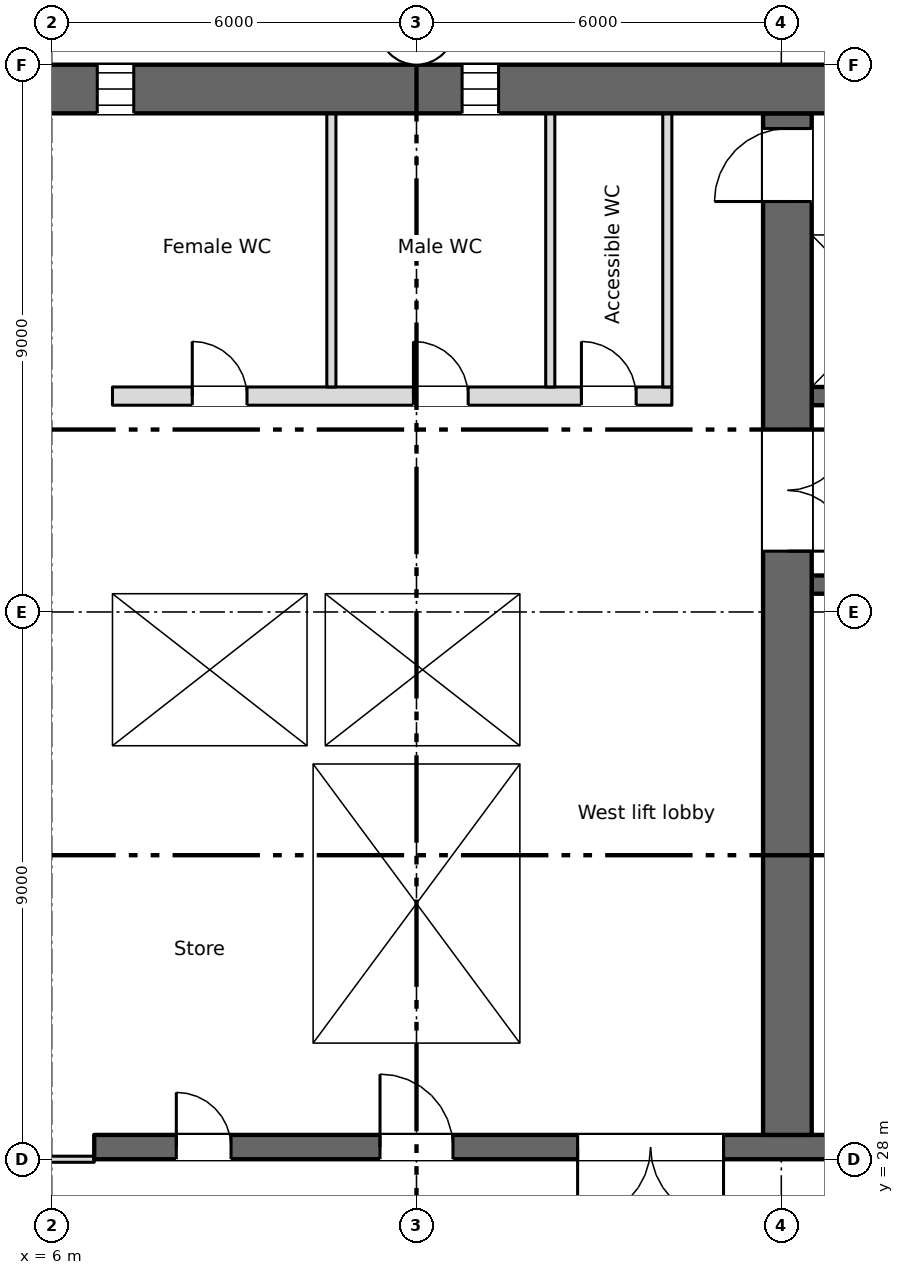
"""IFC4 building model, lengths in metres.
Left out: names, types, materials, properties, quantities, classifications, styles, units other than length and angle.
Written with IfcOpenShell. Run it as: python <this file> out.ifc"""

import sys

from ifc_helpers import new_model, si_unit, direction, frame, frame_2d, origin, place, context, subcontext, project, spatial, rectangle, extrude, element, fill, save


model = new_model("IFC4")
c1 = context("Model", 3, precision=1e-05, world=origin(), true_north=direction((0.0, 1.0)))
c2 = subcontext(c1, "Body", "Model", "MODEL_VIEW")
j1 = project(units=[si_unit("LENGTHUNIT", "METRE"), si_unit("PLANEANGLEUNIT", "RADIAN")], contexts=[c1])
p1 = place(None, origin())
s1 = spatial("IfcSite", under=j1, at=p1, CompositionType="ELEMENT")
p2 = place(p1, origin())
s2 = spatial("IfcBuilding", under=s1, at=p2, CompositionType="ELEMENT")
p3 = place(p2, frame((0.0, 0.0, 102.5)))
s3 = spatial("IfcBuildingStorey", under=s2, at=p3, CompositionType="ELEMENT", Elevation=102.5)
p4 = place(p3, frame((5.55, 45.6, 0.0), z_axis=(0.0, 0.0, 1.0), x_axis=(1.0, 0.0, 0.0)))
e1 = element("IfcWall", 1, at=p4, inside=s3, PredefinedType="SHEAR", context=c2, shape_type="SweptSolid", body=[
    extrude(rectangle(XDim=60.9, YDim=0.8, at=frame_2d((30.45, 0.0))), origin(), (0.0, 0.0, 1.0), 3.35),
])
p5 = place(p4, frame((1.2, 0.0, 0.6)))
e2 = element("IfcOpeningElement", 2, at=p5, cuts=e1, PredefinedType="OPENING", context=c2, shape_type="SweptSolid", body=[
    extrude(rectangle(XDim=0.6, YDim=2.4, at=frame_2d((0.3, 1.2))), frame((0.0, 0.41, 0.0), z_axis=(0.0, -1.0, 0.0), x_axis=(1.0, 0.0, 0.0)), (0.0, 0.0, 1.0), 0.82),
])
p6 = place(p4, frame((7.2, 0.0, 0.6)))
e3 = element("IfcOpeningElement", 3, at=p6, cuts=e1, PredefinedType="OPENING", context=c2, shape_type="SweptSolid", body=[
    extrude(rectangle(XDim=0.6, YDim=2.4, at=frame_2d((0.3, 1.2))), frame((0.0, 0.41, 0.0), z_axis=(0.0, -1.0, 0.0), x_axis=(1.0, 0.0, 0.0)), (0.0, 0.0, 1.0), 0.82),
])
p7 = place(p3, frame((6.7, 28.2, 0.0), z_axis=(0.0, 0.0, 1.0), x_axis=(1.0, 0.0, 0.0)))
e4 = element("IfcWall", 4, at=p7, inside=s3, PredefinedType="SHEAR", context=c2, shape_type="SweptSolid", body=[
    extrude(rectangle(XDim=57.8, YDim=0.4, at=frame_2d((28.9, 0.0))), origin(), (0.0, 0.0, 1.0), 3.35),
])
p8 = place(p7, frame((13.85, 0.0, 0.0)))
e5 = element("IfcOpeningElement", 5, at=p8, cuts=e4, PredefinedType="OPENING", context=c2, shape_type="SweptSolid", body=[
    extrude(rectangle(XDim=0.9, YDim=2.1, at=frame_2d((0.45, 1.05))), frame((0.0, 0.21, 0.0), z_axis=(0.0, -1.0, 0.0), x_axis=(1.0, 0.0, 0.0)), (0.0, 0.0, 1.0), 0.42),
])
p9 = place(p7, frame((48.562, 0.0, 0.0)))
e6 = element("IfcOpeningElement", 6, at=p9, cuts=e4, PredefinedType="OPENING", context=c2, shape_type="SweptSolid", body=[
    extrude(rectangle(XDim=0.9, YDim=2.1, at=frame_2d((0.45, 1.05))), frame((0.0, 0.21, 0.0), z_axis=(0.0, -1.0, 0.0), x_axis=(1.0, 0.0, 0.0)), (0.0, 0.0, 1.0), 0.42),
])
p10 = place(p7, frame((51.137, 0.0, 0.0)))
e7 = element("IfcOpeningElement", 7, at=p10, cuts=e4, PredefinedType="OPENING", context=c2, shape_type="SweptSolid", body=[
    extrude(rectangle(XDim=0.9, YDim=2.1, at=frame_2d((0.45, 1.05))), frame((0.0, 0.21, 0.0), z_axis=(0.0, -1.0, 0.0), x_axis=(1.0, 0.0, 0.0)), (0.0, 0.0, 1.0), 0.42),
])
p11 = place(p7, frame((1.35, 0.0, 0.0)))
e8 = element("IfcOpeningElement", 8, at=p11, cuts=e4, PredefinedType="OPENING", context=c2, shape_type="SweptSolid", body=[
    extrude(rectangle(XDim=0.9, YDim=2.1, at=frame_2d((0.45, 1.05))), frame((0.0, 0.21, 0.0), z_axis=(0.0, -1.0, 0.0), x_axis=(1.0, 0.0, 0.0)), (0.0, 0.0, 1.0), 0.42),
])
p12 = place(p7, frame((4.7, 0.0, 0.0)))
e9 = element("IfcOpeningElement", 9, at=p12, cuts=e4, PredefinedType="OPENING", context=c2, shape_type="SweptSolid", body=[
    extrude(rectangle(XDim=1.2, YDim=2.1, at=frame_2d((0.6, 1.05))), frame((0.0, 0.21, 0.0), z_axis=(0.0, -1.0, 0.0), x_axis=(1.0, 0.0, 0.0)), (0.0, 0.0, 1.0), 0.42),
])
p13 = place(p7, frame((31.7, 0.0, 0.0)))
e10 = element("IfcOpeningElement", 10, at=p13, cuts=e4, PredefinedType="OPENING", context=c2, shape_type="SweptSolid", body=[
    extrude(rectangle(XDim=1.2, YDim=2.1, at=frame_2d((0.6, 1.05))), frame((0.0, 0.21, 0.0), z_axis=(0.0, -1.0, 0.0), x_axis=(1.0, 0.0, 0.0)), (0.0, 0.0, 1.0), 0.42),
])
p14 = place(p7, frame((55.2, 0.0, 0.0)))
e11 = element("IfcOpeningElement", 11, at=p14, cuts=e4, PredefinedType="OPENING", context=c2, shape_type="SweptSolid", body=[
    extrude(rectangle(XDim=1.2, YDim=2.1, at=frame_2d((0.6, 1.05))), frame((0.0, 0.21, 0.0), z_axis=(0.0, -1.0, 0.0), x_axis=(1.0, 0.0, 0.0)), (0.0, 0.0, 1.0), 0.42),
])
p15 = place(p7, frame((21.7, 0.0, 0.0)))
e12 = element("IfcOpeningElement", 12, at=p15, cuts=e4, PredefinedType="OPENING", context=c2, shape_type="SweptSolid", body=[
    extrude(rectangle(XDim=1.2, YDim=2.1, at=frame_2d((0.6, 1.05))), frame((0.0, 0.21, 0.0), z_axis=(0.0, -1.0, 0.0), x_axis=(1.0, 0.0, 0.0)), (0.0, 0.0, 1.0), 0.42),
])
p16 = place(p7, frame((41.7, 0.0, 0.0)))
e13 = element("IfcOpeningElement", 13, at=p16, cuts=e4, PredefinedType="OPENING", context=c2, shape_type="SweptSolid", body=[
    extrude(rectangle(XDim=1.2, YDim=2.1, at=frame_2d((0.6, 1.05))), frame((0.0, 0.21, 0.0), z_axis=(0.0, -1.0, 0.0), x_axis=(1.0, 0.0, 0.0)), (0.0, 0.0, 1.0), 0.42),
])
p17 = place(p7, frame((24.85, 0.0, 0.0)))
e14 = element("IfcOpeningElement", 14, at=p17, cuts=e4, PredefinedType="OPENING", context=c2, shape_type="SweptSolid", body=[
    extrude(rectangle(XDim=2.4, YDim=2.1, at=frame_2d((1.2, 1.05))), frame((0.0, 0.21, 0.0), z_axis=(0.0, -1.0, 0.0), x_axis=(1.0, 0.0, 0.0)), (0.0, 0.0, 1.0), 0.42),
])
p18 = place(p7, frame((37.35, 0.0, 0.0)))
e15 = element("IfcOpeningElement", 15, at=p18, cuts=e4, PredefinedType="OPENING", context=c2, shape_type="SweptSolid", body=[
    extrude(rectangle(XDim=2.4, YDim=2.1, at=frame_2d((1.2, 1.05))), frame((0.0, 0.21, 0.0), z_axis=(0.0, -1.0, 0.0), x_axis=(1.0, 0.0, 0.0)), (0.0, 0.0, 1.0), 0.42),
])
p19 = place(p7, frame((7.95, 0.0, 0.0)))
e16 = element("IfcOpeningElement", 16, at=p19, cuts=e4, PredefinedType="OPENING", context=c2, shape_type="SweptSolid", body=[
    extrude(rectangle(XDim=2.4, YDim=2.1, at=frame_2d((1.2, 1.05))), frame((0.0, 0.21, 0.0), z_axis=(0.0, -1.0, 0.0), x_axis=(1.0, 0.0, 0.0)), (0.0, 0.0, 1.0), 0.42),
])
p20 = place(p7, frame((28.85, 0.0, 0.0)))
e17 = element("IfcOpeningElement", 17, at=p20, cuts=e4, PredefinedType="OPENING", context=c2, shape_type="SweptSolid", body=[
    extrude(rectangle(XDim=0.9, YDim=2.1, at=frame_2d((0.45, 1.05))), frame((0.0, 0.21, 0.0), z_axis=(0.0, -1.0, 0.0), x_axis=(1.0, 0.0, 0.0)), (0.0, 0.0, 1.0), 0.42),
])
p21 = place(p7, frame((34.85, 0.0, 0.0)))
e18 = element("IfcOpeningElement", 18, at=p21, cuts=e4, PredefinedType="OPENING", context=c2, shape_type="SweptSolid", body=[
    extrude(rectangle(XDim=0.9, YDim=2.1, at=frame_2d((0.45, 1.05))), frame((0.0, 0.21, 0.0), z_axis=(0.0, -1.0, 0.0), x_axis=(1.0, 0.0, 0.0)), (0.0, 0.0, 1.0), 0.42),
])
p22 = place(p3, frame((6.85, 28.4, 0.0), z_axis=(0.0, 0.0, 1.0), x_axis=(0.0, 1.0, 0.0)))
e19 = element("IfcWall", 19, at=p22, inside=s3, PredefinedType="SHEAR", context=c2, shape_type="SweptSolid", body=[
    extrude(rectangle(XDim=16.8, YDim=0.3, at=frame_2d((8.4, 0.0))), origin(), (0.0, 0.0, 1.0), 3.35),
])
p23 = place(p3, frame((18.1, 28.4, 0.0), z_axis=(0.0, 0.0, 1.0), x_axis=(0.0, 1.0, 0.0)))
e20 = element("IfcWall", 20, at=p23, inside=s3, PredefinedType="SHEAR", context=c2, shape_type="SweptSolid", body=[
    extrude(rectangle(XDim=16.8, YDim=0.8, at=frame_2d((8.4, 0.0))), origin(), (0.0, 0.0, 1.0), 3.35),
])
p24 = place(p23, frame((9.6, 0.0, 0.0)))
e21 = element("IfcOpeningElement", 21, at=p24, cuts=e20, PredefinedType="OPENING", context=c2, shape_type="SweptSolid", body=[
    extrude(rectangle(XDim=2.0, YDim=2.1, at=frame_2d((1.0, 1.05))), frame((0.0, 0.41, 0.0), z_axis=(0.0, -1.0, 0.0), x_axis=(1.0, 0.0, 0.0)), (0.0, 0.0, 1.0), 0.82),
])
p25 = place(p23, frame((15.35, 0.0, 0.0)))
e22 = element("IfcOpeningElement", 22, at=p25, cuts=e20, PredefinedType="OPENING", context=c2, shape_type="SweptSolid", body=[
    extrude(rectangle(XDim=1.2, YDim=2.1, at=frame_2d((0.6, 1.05))), frame((0.0, 0.41, 0.0), z_axis=(0.0, -1.0, 0.0), x_axis=(1.0, 0.0, 0.0)), (0.0, 0.0, 1.0), 0.82),
])
for number, where, z_axis, x_axis in (
    (23, (10.15, 28.4, 0.0), (0.0, 0.0, 1.0), (0.0, 1.0, 0.0)),
    (24, (13.85, 28.4, 0.0), (0.0, 0.0, 1.0), (0.0, 1.0, 0.0)),
):
    element("IfcWall", number, at=place(p3, frame(where, z_axis=z_axis, x_axis=x_axis)), inside=s3, PredefinedType="SHEAR", context=c2, shape_type="SweptSolid", body=[
        extrude(rectangle(XDim=6.1, YDim=0.3, at=frame_2d((3.05, 0.0))), origin(), (0.0, 0.0, 1.0), 3.35),
    ])
p26 = place(p3, frame((7.0, 34.65, 0.0), z_axis=(0.0, 0.0, 1.0), x_axis=(1.0, 0.0, 0.0)))
e25 = element("IfcWall", 25, at=p26, inside=s3, PredefinedType="SHEAR", context=c2, shape_type="SweptSolid", body=[
    extrude(rectangle(XDim=7.0, YDim=0.3, at=frame_2d((3.5, 0.0))), origin(), (0.0, 0.0, 1.0), 3.35),
])
p27 = place(p3, frame((18.5, 34.65, 0.0), z_axis=(0.0, 0.0, 1.0), x_axis=(1.0, 0.0, 0.0)))
e26 = element("IfcWall", 26, at=p27, inside=s3, PredefinedType="SHEAR", context=c2, shape_type="SweptSolid", body=[
    extrude(rectangle(XDim=12.2, YDim=0.3, at=frame_2d((6.1, 0.0))), origin(), (0.0, 0.0, 1.0), 3.35),
])
p28 = place(p27, frame((9.8, 0.0, 0.0)))
e27 = element("IfcOpeningElement", 27, at=p28, cuts=e26, PredefinedType="OPENING", context=c2, shape_type="SweptSolid", body=[
    extrude(rectangle(XDim=1.1, YDim=2.1, at=frame_2d((0.55, 1.05))), frame((0.0, 0.16, 0.0), z_axis=(0.0, -1.0, 0.0), x_axis=(1.0, 0.0, 0.0)), (0.0, 0.0, 1.0), 0.32),
])
p29 = place(p3, frame((7.0, 37.45, 0.0), z_axis=(0.0, 0.0, 1.0), x_axis=(1.0, 0.0, 0.0)))
e28 = element("IfcWall", 28, at=p29, inside=s3, PredefinedType="SHEAR", context=c2, shape_type="SweptSolid", body=[
    extrude(rectangle(XDim=7.0, YDim=0.3, at=frame_2d((3.5, 0.0))), origin(), (0.0, 0.0, 1.0), 3.35),
])
p30 = place(p3, frame((30.7, 37.45, 0.0), z_axis=(0.0, 0.0, 1.0), x_axis=(-1.0, 0.0, 0.0)))
e29 = element("IfcWall", 29, at=p30, inside=s3, PredefinedType="SHEAR", context=c2, shape_type="SweptSolid", body=[
    extrude(rectangle(XDim=12.2, YDim=0.3, at=frame_2d((6.1, 0.0))), origin(), (0.0, 0.0, 1.0), 3.35),
])
p31 = place(p30, frame((7.4, 0.0, 0.0)))
e30 = element("IfcOpeningElement", 30, at=p31, cuts=e29, PredefinedType="OPENING", context=c2, shape_type="SweptSolid", body=[
    extrude(rectangle(XDim=0.9, YDim=2.1, at=frame_2d((0.45, 1.05))), frame((0.0, 0.16, 0.0), z_axis=(0.0, -1.0, 0.0), x_axis=(1.0, 0.0, 0.0)), (0.0, 0.0, 1.0), 0.32),
])
p32 = place(p3, frame((13.85, 34.8, 0.0), z_axis=(0.0, 0.0, 1.0), x_axis=(0.0, 1.0, 0.0)))
e31 = element("IfcWall", 31, at=p32, inside=s3, PredefinedType="SHEAR", context=c2, shape_type="SweptSolid", body=[
    extrude(rectangle(XDim=2.5, YDim=0.3, at=frame_2d((1.25, 0.0))), origin(), (0.0, 0.0, 1.0), 3.35),
])
p33 = place(p3, frame((18.5, 40.55, 0.0), z_axis=(0.0, 0.0, 1.0), x_axis=(1.0, 0.0, 0.0)))
e32 = element("IfcWall", 32, at=p33, inside=s3, PredefinedType="SHEAR", context=c2, shape_type="SweptSolid", body=[
    extrude(rectangle(XDim=41.0, YDim=0.3, at=frame_2d((20.5, 0.0))), origin(), (0.0, 0.0, 1.0), 3.35),
])
p34 = place(p33, frame((18.65, 0.0, 0.0)))
e33 = element("IfcOpeningElement", 33, at=p34, cuts=e32, PredefinedType="OPENING", context=c2, shape_type="SweptSolid", body=[
    extrude(rectangle(XDim=0.9, YDim=2.1, at=frame_2d((0.45, 1.05))), frame((0.0, 0.16, 0.0), z_axis=(0.0, -1.0, 0.0), x_axis=(1.0, 0.0, 0.0)), (0.0, 0.0, 1.0), 0.32),
])
p35 = place(p33, frame((6.175, 0.0, 0.0)))
e34 = element("IfcOpeningElement", 34, at=p35, cuts=e32, PredefinedType="OPENING", context=c2, shape_type="SweptSolid", body=[
    extrude(rectangle(XDim=1.1, YDim=2.1, at=frame_2d((0.55, 1.05))), frame((0.0, 0.16, 0.0), z_axis=(0.0, -1.0, 0.0), x_axis=(1.0, 0.0, 0.0)), (0.0, 0.0, 1.0), 0.32),
])
p36 = place(p33, frame((8.925, 0.0, 0.0)))
e35 = element("IfcOpeningElement", 35, at=p36, cuts=e32, PredefinedType="OPENING", context=c2, shape_type="SweptSolid", body=[
    extrude(rectangle(XDim=1.1, YDim=2.1, at=frame_2d((0.55, 1.05))), frame((0.0, 0.16, 0.0), z_axis=(0.0, -1.0, 0.0), x_axis=(1.0, 0.0, 0.0)), (0.0, 0.0, 1.0), 0.32),
])
p37 = place(p33, frame((11.675, 0.0, 0.0)))
e36 = element("IfcOpeningElement", 36, at=p37, cuts=e32, PredefinedType="OPENING", context=c2, shape_type="SweptSolid", body=[
    extrude(rectangle(XDim=1.1, YDim=2.1, at=frame_2d((0.55, 1.05))), frame((0.0, 0.16, 0.0), z_axis=(0.0, -1.0, 0.0), x_axis=(1.0, 0.0, 0.0)), (0.0, 0.0, 1.0), 0.32),
])
p38 = place(p33, frame((30.925, 0.0, 0.0)))
e37 = element("IfcOpeningElement", 37, at=p38, cuts=e32, PredefinedType="OPENING", context=c2, shape_type="SweptSolid", body=[
    extrude(rectangle(XDim=1.1, YDim=2.1, at=frame_2d((0.55, 1.05))), frame((0.0, 0.16, 0.0), z_axis=(0.0, -1.0, 0.0), x_axis=(1.0, 0.0, 0.0)), (0.0, 0.0, 1.0), 0.32),
])
p39 = place(p33, frame((33.675, 0.0, 0.0)))
e38 = element("IfcOpeningElement", 38, at=p39, cuts=e32, PredefinedType="OPENING", context=c2, shape_type="SweptSolid", body=[
    extrude(rectangle(XDim=1.1, YDim=2.1, at=frame_2d((0.55, 1.05))), frame((0.0, 0.16, 0.0), z_axis=(0.0, -1.0, 0.0), x_axis=(1.0, 0.0, 0.0)), (0.0, 0.0, 1.0), 0.32),
])
p40 = place(p33, frame((36.375, 0.0, 0.0)))
e39 = element("IfcOpeningElement", 39, at=p40, cuts=e32, PredefinedType="OPENING", context=c2, shape_type="SweptSolid", body=[
    extrude(rectangle(XDim=1.2, YDim=2.1, at=frame_2d((0.6, 1.05))), frame((0.0, 0.16, 0.0), z_axis=(0.0, -1.0, 0.0), x_axis=(1.0, 0.0, 0.0)), (0.0, 0.0, 1.0), 0.32),
])
p41 = place(p33, frame((39.15, 0.0, 0.0)))
e40 = element("IfcOpeningElement", 40, at=p41, cuts=e32, PredefinedType="OPENING", context=c2, shape_type="SweptSolid", body=[
    extrude(rectangle(XDim=1.2, YDim=2.1, at=frame_2d((0.6, 1.05))), frame((0.0, 0.16, 0.0), z_axis=(0.0, -1.0, 0.0), x_axis=(1.0, 0.0, 0.0)), (0.0, 0.0, 1.0), 0.32),
])
p42 = place(p3, frame((18.5, 43.35, 0.0), z_axis=(0.0, 0.0, 1.0), x_axis=(1.0, 0.0, 0.0)))
e41 = element("IfcWall", 41, at=p42, inside=s3, PredefinedType="SHEAR", context=c2, shape_type="SweptSolid", body=[
    extrude(rectangle(XDim=41.0, YDim=0.3, at=frame_2d((20.5, 0.0))), origin(), (0.0, 0.0, 1.0), 3.35),
])
p43 = place(p3, frame((7.0, 40.55, 0.0), z_axis=(0.0, 0.0, 1.0), x_axis=(1.0, 0.0, 0.0)))
e42 = element("IfcWall", 42, at=p43, inside=s3, PredefinedType="PARTITIONING", context=c2, shape_type="SweptSolid", body=[
    extrude(rectangle(XDim=9.2, YDim=0.3, at=frame_2d((4.6, 0.0))), origin(), (0.0, 0.0, 1.0), 3.35),
])
p44 = place(p43, frame((1.312, 0.0, 0.0)))
e43 = element("IfcOpeningElement", 43, at=p44, cuts=e42, PredefinedType="OPENING", context=c2, shape_type="SweptSolid", body=[
    extrude(rectangle(XDim=0.9, YDim=2.1, at=frame_2d((0.45, 1.05))), frame((0.0, 0.16, 0.0), z_axis=(0.0, -1.0, 0.0), x_axis=(1.0, 0.0, 0.0)), (0.0, 0.0, 1.0), 0.32),
])
p45 = place(p43, frame((4.95, 0.0, 0.0)))
e44 = element("IfcOpeningElement", 44, at=p45, cuts=e42, PredefinedType="OPENING", context=c2, shape_type="SweptSolid", body=[
    extrude(rectangle(XDim=0.9, YDim=2.1, at=frame_2d((0.45, 1.05))), frame((0.0, 0.16, 0.0), z_axis=(0.0, -1.0, 0.0), x_axis=(1.0, 0.0, 0.0)), (0.0, 0.0, 1.0), 0.32),
])
p46 = place(p43, frame((7.712, 0.0, 0.0)))
e45 = element("IfcOpeningElement", 45, at=p46, cuts=e42, PredefinedType="OPENING", context=c2, shape_type="SweptSolid", body=[
    extrude(rectangle(XDim=0.9, YDim=2.1, at=frame_2d((0.45, 1.05))), frame((0.0, 0.16, 0.0), z_axis=(0.0, -1.0, 0.0), x_axis=(1.0, 0.0, 0.0)), (0.0, 0.0, 1.0), 0.32),
])
p47 = place(p3, frame((10.35, 34.8, 0.0), z_axis=(0.0, 0.0, 1.0), x_axis=(0.0, 1.0, 0.0)))
e46 = element("IfcWall", 46, at=p47, inside=s3, PredefinedType="SHEAR", context=c2, shape_type="SweptSolid", body=[
    extrude(rectangle(XDim=2.5, YDim=0.3, at=frame_2d((1.25, 0.0))), origin(), (0.0, 0.0, 1.0), 3.35),
])
for number, where, z_axis, x_axis in (
    (47, (16.125, 40.7, 0.0), (0.0, 0.0, 1.0), (0.0, 1.0, 0.0)),
    (48, (10.6, 40.7, 0.0), (0.0, 0.0, 1.0), (0.0, 1.0, 0.0)),
    (49, (14.2, 40.7, 0.0), (0.0, 0.0, 1.0), (0.0, 1.0, 0.0)),
):
    element("IfcWall", number, at=place(p3, frame(where, z_axis=z_axis, x_axis=x_axis)), inside=s3, PredefinedType="PARTITIONING", context=c2, shape_type="SweptSolid", body=[
        extrude(rectangle(XDim=4.5, YDim=0.15, at=frame_2d((2.25, 0.0))), origin(), (0.0, 0.0, 1.0), 3.35),
    ])
p48 = place(p3, frame((0.7, 28.0, 0.0), z_axis=(0.0, 0.0, 1.0), x_axis=(1.0, 0.0, 0.0)))
e50 = element("IfcWall", 50, at=p48, inside=s3, PredefinedType="PARTITIONING", context=c2, shape_type="SweptSolid", body=[
    extrude(rectangle(XDim=6.0, YDim=0.1, at=frame_2d((3.0, 0.0))), origin(), (0.0, 0.0, 1.0), 3.35),
])
p49 = place(p48, frame((2.1, 0.0, 0.0)))
e51 = element("IfcOpeningElement", 51, at=p49, cuts=e50, PredefinedType="OPENING", context=c2, shape_type="SweptSolid", body=[
    extrude(rectangle(XDim=1.8, YDim=2.1, at=frame_2d((0.9, 1.05))), frame((0.0, 0.06, 0.0), z_axis=(0.0, -1.0, 0.0), x_axis=(1.0, 0.0, 0.0)), (0.0, 0.0, 1.0), 0.12),
])
p50 = place(p5, origin())
e52 = element("IfcWindow", 52, at=p50, inside=s3, PartitioningType="SINGLE_PANEL", PredefinedType="WINDOW", context=c2, shape_type="SweptSolid", body=[
    extrude(rectangle(XDim=0.6, YDim=2.4, at=frame_2d((0.3, 1.2))), frame((0.0, 0.03, 0.0), z_axis=(0.0, -1.0, 0.0), x_axis=(1.0, 0.0, 0.0)), (0.0, 0.0, 1.0), 0.06),
])
fill(e2, e52)
p51 = place(p6, origin())
e53 = element("IfcWindow", 53, at=p51, inside=s3, PartitioningType="SINGLE_PANEL", PredefinedType="WINDOW", context=c2, shape_type="SweptSolid", body=[
    extrude(rectangle(XDim=0.6, YDim=2.4, at=frame_2d((0.3, 1.2))), frame((0.0, 0.03, 0.0), z_axis=(0.0, -1.0, 0.0), x_axis=(1.0, 0.0, 0.0)), (0.0, 0.0, 1.0), 0.06),
])
fill(e3, e53)
p52 = place(p11, origin())
e54 = element("IfcDoor", 54, at=p52, inside=s3, OperationType="SINGLE_SWING_LEFT", PredefinedType="DOOR", context=c2, shape_type="SweptSolid", body=[
    extrude(rectangle(XDim=0.9, YDim=2.1, at=frame_2d((0.45, 1.05))), frame((0.0, 0.025, 0.0), z_axis=(0.0, -1.0, 0.0), x_axis=(1.0, 0.0, 0.0)), (0.0, 0.0, 1.0), 0.05),
])
fill(e8, e54)
p53 = place(p44, origin())
e55 = element("IfcDoor", 55, at=p53, inside=s3, OperationType="SINGLE_SWING_LEFT", PredefinedType="DOOR", context=c2, shape_type="SweptSolid", body=[
    extrude(rectangle(XDim=0.9, YDim=2.1, at=frame_2d((0.45, 1.05))), frame((0.0, 0.025, 0.0), z_axis=(0.0, -1.0, 0.0), x_axis=(1.0, 0.0, 0.0)), (0.0, 0.0, 1.0), 0.05),
])
fill(e43, e55)
p54 = place(p45, origin())
e56 = element("IfcDoor", 56, at=p54, inside=s3, OperationType="SINGLE_SWING_LEFT", PredefinedType="DOOR", context=c2, shape_type="SweptSolid", body=[
    extrude(rectangle(XDim=0.9, YDim=2.1, at=frame_2d((0.45, 1.05))), frame((0.0, 0.025, 0.0), z_axis=(0.0, -1.0, 0.0), x_axis=(1.0, 0.0, 0.0)), (0.0, 0.0, 1.0), 0.05),
])
fill(e44, e56)
p55 = place(p46, origin())
e57 = element("IfcDoor", 57, at=p55, inside=s3, OperationType="SINGLE_SWING_LEFT", PredefinedType="DOOR", context=c2, shape_type="SweptSolid", body=[
    extrude(rectangle(XDim=0.9, YDim=2.1, at=frame_2d((0.45, 1.05))), frame((0.0, 0.025, 0.0), z_axis=(0.0, -1.0, 0.0), x_axis=(1.0, 0.0, 0.0)), (0.0, 0.0, 1.0), 0.05),
])
fill(e45, e57)
p56 = place(p12, origin())
e58 = element("IfcDoor", 58, at=p56, inside=s3, OperationType="SINGLE_SWING_LEFT", PredefinedType="DOOR", context=c2, shape_type="SweptSolid", body=[
    extrude(rectangle(XDim=1.2, YDim=2.1, at=frame_2d((0.6, 1.05))), frame((0.0, 0.025, 0.0), z_axis=(0.0, -1.0, 0.0), x_axis=(1.0, 0.0, 0.0)), (0.0, 0.0, 1.0), 0.05),
])
fill(e9, e58)
p57 = place(p19, origin())
e59 = element("IfcDoor", 59, at=p57, inside=s3, OperationType="DOUBLE_DOOR_SINGLE_SWING", PredefinedType="DOOR", context=c2, shape_type="SweptSolid", body=[
    extrude(rectangle(XDim=2.4, YDim=2.1, at=frame_2d((1.2, 1.05))), frame((0.0, 0.025, 0.0), z_axis=(0.0, -1.0, 0.0), x_axis=(1.0, 0.0, 0.0)), (0.0, 0.0, 1.0), 0.05),
])
fill(e16, e59)
p58 = place(p24, origin())
e60 = element("IfcDoor", 60, at=p58, inside=s3, OperationType="DOUBLE_DOOR_SINGLE_SWING", PredefinedType="DOOR", context=c2, shape_type="SweptSolid", body=[
    extrude(rectangle(XDim=2.0, YDim=2.1, at=frame_2d((1.0, 1.05))), frame((0.0, 0.025, 0.0), z_axis=(0.0, -1.0, 0.0), x_axis=(1.0, 0.0, 0.0)), (0.0, 0.0, 1.0), 0.05),
])
fill(e21, e60)
p59 = place(p25, origin())
e61 = element("IfcDoor", 61, at=p59, inside=s3, OperationType="SINGLE_SWING_LEFT", PredefinedType="DOOR", context=c2, shape_type="SweptSolid", body=[
    extrude(rectangle(XDim=1.2, YDim=2.1, at=frame_2d((0.6, 1.05))), frame((0.0, 0.025, 0.0), z_axis=(0.0, -1.0, 0.0), x_axis=(1.0, 0.0, 0.0)), (0.0, 0.0, 1.0), 0.05),
])
fill(e22, e61)
save(model, sys.argv[1])
